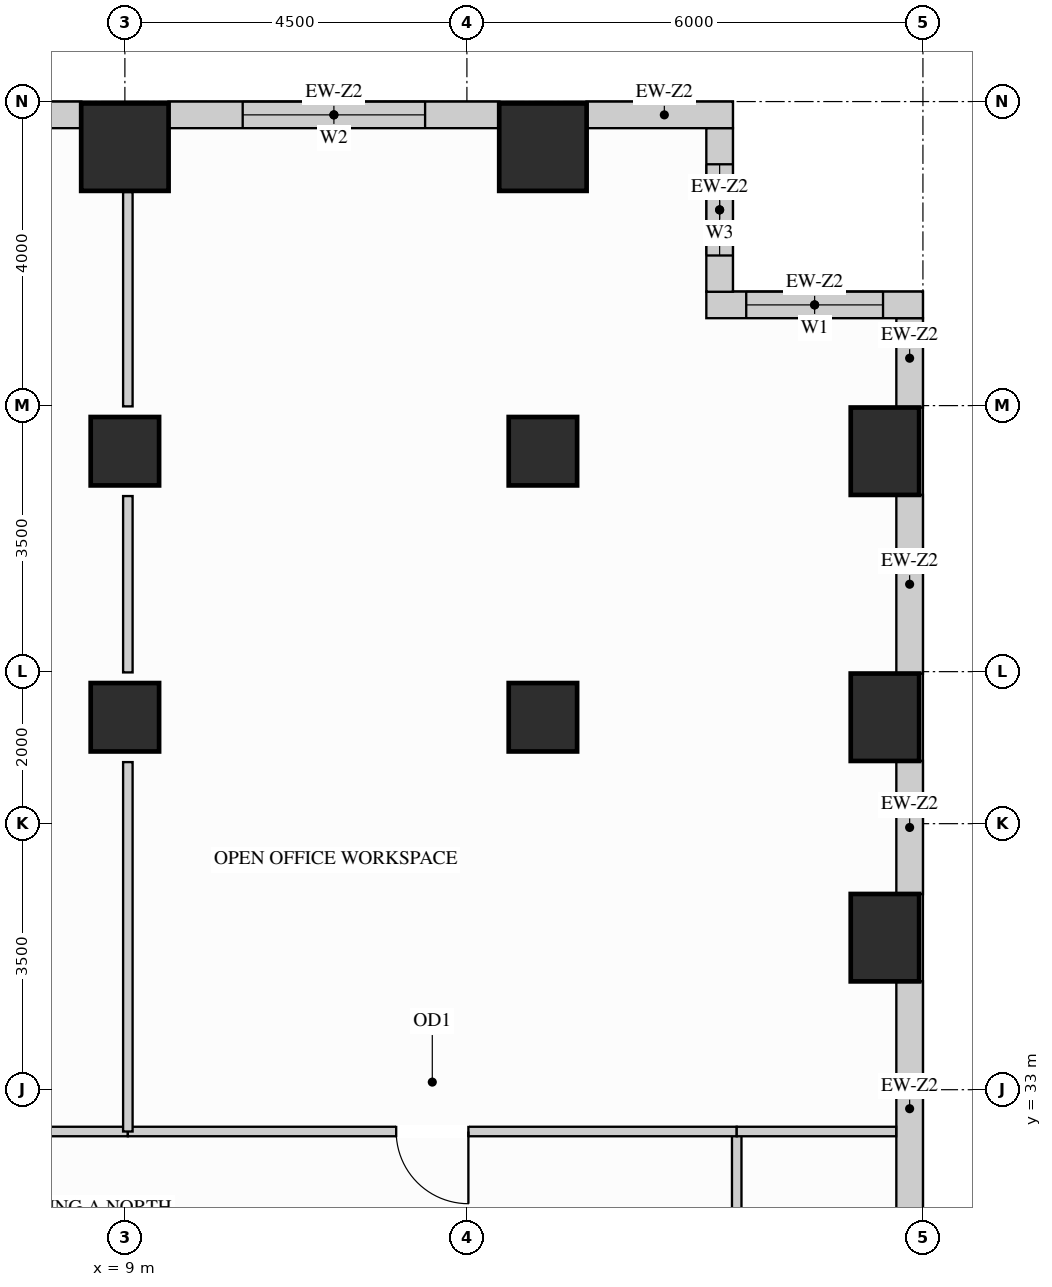
"""IFC4 building model, lengths in metres.
Left out: names, types, materials, properties, quantities, classifications, styles, units other than length and angle.
Written with IfcOpenShell. Run it as: python <this file> out.ifc"""

import sys

from ifc_helpers import new_model, si_unit, direction, frame, frame_2d, origin, origin_2d, place, context, subcontext, project, spatial, rectangle, extrude, source, transform, mapped, element, fill, save


model = new_model("IFC4")
c1 = context("Model", 3, precision=1e-05, world=origin(), true_north=direction((0.0, 1.0)))
c2 = subcontext(c1, "Body", "Model", "MODEL_VIEW")
j1 = project(units=[si_unit("LENGTHUNIT", "METRE"), si_unit("PLANEANGLEUNIT", "RADIAN")], contexts=[c1])
p1 = place(None, origin())
s1 = spatial("IfcSite", under=j1, at=p1, CompositionType="ELEMENT")
p2 = place(p1, origin())
s2 = spatial("IfcBuilding", under=s1, at=p2, CompositionType="ELEMENT")
p3 = place(p2, frame((0.0, 0.0, 131.4)))
s3 = spatial("IfcBuildingStorey", under=s2, at=p3, CompositionType="ELEMENT", Elevation=131.4)
m1 = source(origin(), c2, "Body", "SweptSolid", [
    extrude(rectangle(XDim=0.9, YDim=0.9, at=origin_2d()), origin(), (0.0, 0.0, 1.0), 3.38),
])
for number, where, z_axis, x_axis in (
    (1, (14.5, 37.9, 0.0), (0.0, 0.0, 1.0), (1.0, 0.0, 0.0)),
    (2, (14.5, 41.4, 0.0), (0.0, 0.0, 1.0), (1.0, 0.0, 0.0)),
    (3, (9.0, 37.9, 0.0), (0.0, 0.0, 1.0), (1.0, 0.0, 0.0)),
    (4, (9.0, 41.4, 0.0), (0.0, 0.0, 1.0), (1.0, 0.0, 0.0)),
):
    element("IfcColumn", number, at=place(p3, frame(where, z_axis=z_axis, x_axis=x_axis)), inside=s3, PredefinedType="COLUMN", context=c2, shape_type="MappedRepresentation", body=[
        mapped(m1, transform((0.0, 0.0, 0.0), x_axis=(1.0, 0.0, 0.0), y_axis=(0.0, 1.0, 0.0), z_axis=(0.0, 0.0, 1.0))),
    ])
m2 = source(origin(), c2, "Body", "SweptSolid", [
    extrude(rectangle(XDim=0.9, YDim=1.15, at=origin_2d()), origin(), (0.0, 0.0, 1.0), 3.38),
])
for number, where, z_axis, x_axis in (
    (5, (19.0, 35.0, 0.0), (0.0, 0.0, 1.0), (1.0, 0.0, 0.0)),
    (6, (19.0, 37.9, 0.0), (0.0, 0.0, 1.0), (1.0, 0.0, 0.0)),
    (7, (19.0, 41.4, 0.0), (0.0, 0.0, 1.0), (1.0, 0.0, 0.0)),
):
    element("IfcColumn", number, at=place(p3, frame(where, z_axis=z_axis, x_axis=x_axis)), inside=s3, PredefinedType="COLUMN", context=c2, shape_type="MappedRepresentation", body=[
        mapped(m2, transform((0.0, 0.0, 0.0), x_axis=(1.0, 0.0, 0.0), y_axis=(0.0, 1.0, 0.0), z_axis=(0.0, 0.0, 1.0))),
    ])
m3 = source(origin(), c2, "Body", "SweptSolid", [
    extrude(rectangle(XDim=1.15, YDim=1.15, at=origin_2d()), origin(), (0.0, 0.0, 1.0), 3.38),
])
for number, where, z_axis, x_axis in (
    (8, (14.5, 45.4, 0.0), (0.0, 0.0, 1.0), (1.0, 0.0, 0.0)),
    (9, (9.0, 45.4, 0.0), (0.0, 0.0, 1.0), (1.0, 0.0, 0.0)),
):
    element("IfcColumn", number, at=place(p3, frame(where, z_axis=z_axis, x_axis=x_axis)), inside=s3, PredefinedType="COLUMN", context=c2, shape_type="MappedRepresentation", body=[
        mapped(m3, transform((0.0, 0.0, 0.0), x_axis=(1.0, 0.0, 0.0), y_axis=(0.0, 1.0, 0.0), z_axis=(0.0, 0.0, 1.0))),
    ])
m4 = source(origin(), c2, "Body", "SweptSolid", [
    extrude(rectangle(XDim=3.354, YDim=0.35, at=frame_2d((1.677, 0.0))), origin(), (0.0, 0.0, 1.0), 2.519),
])
p4 = place(p3, frame((19.325, 31.073, 0.0), z_axis=(0.0, 0.0, 1.0), x_axis=(0.0, 1.0, 0.0)))
e10 = element("IfcWall", 10, at=p4, inside=s3, PredefinedType="SOLIDWALL", context=c2, shape_type="MappedRepresentation", body=[
    mapped(m4, transform((0.0, 0.0, 0.0), x_axis=(1.0, 0.0, 0.0), y_axis=(0.0, 1.0, 0.0), z_axis=(0.0, 0.0, 1.0))),
])
m5 = source(origin(), c2, "Body", "SweptSolid", [
    extrude(rectangle(XDim=1.754, YDim=0.35, at=frame_2d((0.877, 0.0))), origin(), (0.0, 0.0, 1.0), 2.519),
])
p5 = place(p3, frame((19.325, 35.573, 0.0), z_axis=(0.0, 0.0, 1.0), x_axis=(0.0, 1.0, 0.0)))
e11 = element("IfcWall", 11, at=p5, inside=s3, PredefinedType="SOLIDWALL", context=c2, shape_type="MappedRepresentation", body=[
    mapped(m5, transform((0.0, 0.0, 0.0), x_axis=(1.0, 0.0, 0.0), y_axis=(0.0, 1.0, 0.0), z_axis=(0.0, 0.0, 1.0))),
])
m6 = source(origin(), c2, "Body", "SweptSolid", [
    extrude(rectangle(XDim=2.354, YDim=0.35, at=frame_2d((1.177, 0.0))), origin(), (0.0, 0.0, 1.0), 2.519),
])
p6 = place(p3, frame((19.325, 38.473, 0.0), z_axis=(0.0, 0.0, 1.0), x_axis=(0.0, 1.0, 0.0)))
e12 = element("IfcWall", 12, at=p6, inside=s3, PredefinedType="SOLIDWALL", context=c2, shape_type="MappedRepresentation", body=[
    mapped(m6, transform((0.0, 0.0, 0.0), x_axis=(1.0, 0.0, 0.0), y_axis=(0.0, 1.0, 0.0), z_axis=(0.0, 0.0, 1.0))),
])
m7 = source(origin(), c2, "Body", "SweptSolid", [
    extrude(rectangle(XDim=1.179, YDim=0.35, at=frame_2d((0.59, 0.0))), origin(), (0.0, 0.0, 1.0), 3.365),
])
p7 = place(p3, frame((19.325, 41.973, 0.0), z_axis=(0.0, 0.0, 1.0), x_axis=(0.0, 1.0, 0.0)))
e13 = element("IfcWall", 13, at=p7, inside=s3, PredefinedType="SOLIDWALL", context=c2, shape_type="MappedRepresentation", body=[
    mapped(m7, transform((0.0, 0.0, 0.0), x_axis=(1.0, 0.0, 0.0), y_axis=(0.0, 1.0, 0.0), z_axis=(0.0, 0.0, 1.0))),
])
p8 = place(p3, frame((19.5, 43.325, 0.0), z_axis=(0.0, 0.0, 1.0), x_axis=(-1.0, 0.0, 0.0)))
e14 = element("IfcWall", 14, at=p8, inside=s3, PredefinedType="SOLIDWALL", context=c2, shape_type="SweptSolid", body=[
    extrude(rectangle(XDim=2.85, YDim=0.35, at=frame_2d((1.425, 0.0))), origin(), (0.0, 0.0, 1.0), 3.365),
])
p9 = place(p8, frame((0.525, 0.0, 0.78)))
e15 = element("IfcOpeningElement", 15, at=p9, cuts=e14, PredefinedType="OPENING", context=c2, shape_type="SweptSolid", body=[
    extrude(rectangle(XDim=1.8, YDim=2.1, at=frame_2d((0.9, 1.05))), frame((0.0, 0.185, 0.0), z_axis=(0.0, -1.0, 0.0), x_axis=(1.0, 0.0, 0.0)), (0.0, 0.0, 1.0), 0.37),
])
p10 = place(p3, frame((16.825, 43.498, 0.0), z_axis=(0.0, 0.0, 1.0), x_axis=(0.0, 1.0, 0.0)))
e16 = element("IfcWall", 16, at=p10, inside=s3, PredefinedType="SOLIDWALL", context=c2, shape_type="SweptSolid", body=[
    extrude(rectangle(XDim=2.154, YDim=0.35, at=frame_2d((1.077, 0.0))), origin(), (0.0, 0.0, 1.0), 3.365),
])
p11 = place(p10, frame((0.477, 0.0, 0.78)))
e17 = element("IfcOpeningElement", 17, at=p11, cuts=e16, PredefinedType="OPENING", context=c2, shape_type="SweptSolid", body=[
    extrude(rectangle(XDim=1.2, YDim=2.1, at=frame_2d((0.6, 1.05))), frame((0.0, 0.185, 0.0), z_axis=(0.0, -1.0, 0.0), x_axis=(1.0, 0.0, 0.0)), (0.0, 0.0, 1.0), 0.37),
])
m8 = source(origin(), c2, "Body", "SweptSolid", [
    extrude(rectangle(XDim=1.927, YDim=0.35, at=frame_2d((0.963, 0.0))), origin(), (0.0, 0.0, 1.0), 3.365),
])
p12 = place(p3, frame((17.0, 45.825, 0.0), z_axis=(0.0, 0.0, 1.0), x_axis=(-1.0, 0.0, 0.0)))
e18 = element("IfcWall", 18, at=p12, inside=s3, PredefinedType="SOLIDWALL", context=c2, shape_type="MappedRepresentation", body=[
    mapped(m8, transform((0.0, 0.0, 0.0), x_axis=(1.0, 0.0, 0.0), y_axis=(0.0, 1.0, 0.0), z_axis=(0.0, 0.0, 1.0))),
])
p13 = place(p3, frame((13.927, 45.825, 0.0), z_axis=(0.0, 0.0, 1.0), x_axis=(-1.0, 0.0, 0.0)))
e19 = element("IfcWall", 19, at=p13, inside=s3, PredefinedType="SOLIDWALL", context=c2, shape_type="SweptSolid", body=[
    extrude(rectangle(XDim=4.354, YDim=0.35, at=frame_2d((2.177, 0.0))), origin(), (0.0, 0.0, 1.0), 3.365),
])
p14 = place(p13, frame((0.977, 0.0, 0.78)))
e20 = element("IfcOpeningElement", 20, at=p14, cuts=e19, PredefinedType="OPENING", context=c2, shape_type="SweptSolid", body=[
    extrude(rectangle(XDim=2.4, YDim=2.1, at=frame_2d((1.2, 1.05))), frame((0.0, 0.185, 0.0), z_axis=(0.0, -1.0, 0.0), x_axis=(1.0, 0.0, 0.0)), (0.0, 0.0, 1.0), 0.37),
])
p15 = place(p3, frame((8.427, 45.825, 0.0), z_axis=(0.0, 0.0, 1.0), x_axis=(-1.0, 0.0, 0.0)))
e21 = element("IfcWall", 21, at=p15, inside=s3, PredefinedType="SOLIDWALL", context=c2, shape_type="SweptSolid", body=[
    extrude(rectangle(XDim=4.354, YDim=0.35, at=frame_2d((2.177, 0.0))), origin(), (0.0, 0.0, 1.0), 3.365),
])
p16 = place(p15, frame((0.977, 0.0, 0.78)))
e22 = element("IfcOpeningElement", 22, at=p16, cuts=e21, PredefinedType="OPENING", context=c2, shape_type="SweptSolid", body=[
    extrude(rectangle(XDim=2.4, YDim=2.1, at=frame_2d((1.2, 1.05))), frame((0.0, 0.185, 0.0), z_axis=(0.0, -1.0, 0.0), x_axis=(1.0, 0.0, 0.0)), (0.0, 0.0, 1.0), 0.37),
])
p17 = place(p3, frame((17.05, 26.05, 0.0), z_axis=(0.0, 0.0, 1.0), x_axis=(0.0, 1.0, 0.0)))
e23 = element("IfcWall", 23, at=p17, inside=s3, PredefinedType="PARTITIONING", context=c2, shape_type="SweptSolid", body=[
    extrude(rectangle(XDim=6.4, YDim=0.125, at=frame_2d((3.2, 0.0))), origin(), (0.0, 0.0, 1.0), 3.365),
])
p18 = place(p17, frame((2.725, 0.0, 0.0)))
e24 = element("IfcOpeningElement", 24, at=p18, cuts=e23, PredefinedType="OPENING", context=c2, shape_type="SweptSolid", body=[
    extrude(rectangle(XDim=0.95, YDim=2.15, at=frame_2d((0.475, 1.075))), frame((0.0, 0.073, 0.0), z_axis=(0.0, -1.0, 0.0), x_axis=(1.0, 0.0, 0.0)), (0.0, 0.0, 1.0), 0.145),
])
p19 = place(p3, frame((2.45, 32.45, 0.0), z_axis=(0.0, 0.0, 1.0), x_axis=(1.0, 0.0, 0.0)))
e25 = element("IfcWall", 25, at=p19, inside=s3, PredefinedType="PARTITIONING", context=c2, shape_type="SweptSolid", body=[
    extrude(rectangle(XDim=6.589, YDim=0.125, at=frame_2d((3.294, 0.0))), origin(), (0.0, 0.0, 1.0), 3.365),
])
p20 = place(p19, frame((2.82, 0.0, 0.0)))
e26 = element("IfcOpeningElement", 26, at=p20, cuts=e25, PredefinedType="OPENING", context=c2, shape_type="SweptSolid", body=[
    extrude(rectangle(XDim=0.95, YDim=2.15, at=frame_2d((0.475, 1.075))), frame((0.0, 0.073, 0.0), z_axis=(0.0, -1.0, 0.0), x_axis=(1.0, 0.0, 0.0)), (0.0, 0.0, 1.0), 0.145),
])
p21 = place(p3, frame((9.039, 32.45, 0.0), z_axis=(0.0, 0.0, 1.0), x_axis=(1.0, 0.0, 0.0)))
e27 = element("IfcWall", 27, at=p21, inside=s3, PredefinedType="PARTITIONING", context=c2, shape_type="SweptSolid", body=[
    extrude(rectangle(XDim=8.011, YDim=0.125, at=frame_2d((4.005, 0.0))), origin(), (0.0, 0.0, 1.0), 3.365),
])
p22 = place(p21, frame((3.531, 0.0, 0.0)))
e28 = element("IfcOpeningElement", 28, at=p22, cuts=e27, PredefinedType="OPENING", context=c2, shape_type="SweptSolid", body=[
    extrude(rectangle(XDim=0.95, YDim=2.15, at=frame_2d((0.475, 1.075))), frame((0.0, 0.073, 0.0), z_axis=(0.0, -1.0, 0.0), x_axis=(1.0, 0.0, 0.0)), (0.0, 0.0, 1.0), 0.145),
])
m9 = source(origin(), c2, "Body", "SweptSolid", [
    extrude(rectangle(XDim=2.098, YDim=0.125, at=frame_2d((1.049, 0.0))), origin(), (0.0, 0.0, 1.0), 3.365),
])
p23 = place(p3, frame((17.05, 32.45, 0.0), z_axis=(0.0, 0.0, 1.0), x_axis=(1.0, 0.0, 0.0)))
e29 = element("IfcWall", 29, at=p23, inside=s3, PredefinedType="PARTITIONING", context=c2, shape_type="MappedRepresentation", body=[
    mapped(m9, transform((0.0, 0.0, 0.0), x_axis=(1.0, 0.0, 0.0), y_axis=(0.0, 1.0, 0.0), z_axis=(0.0, 0.0, 1.0))),
])
m10 = source(origin(), c2, "Body", "SweptSolid", [
    extrude(rectangle(XDim=4.86, YDim=0.125, at=frame_2d((2.43, 0.0))), origin(), (0.0, 0.0, 1.0), 3.365),
])
p24 = place(p3, frame((9.039, 32.45, 0.0), z_axis=(0.0, 0.0, 1.0), x_axis=(0.0, 1.0, 0.0)))
e30 = element("IfcWall", 30, at=p24, inside=s3, PredefinedType="PARTITIONING", context=c2, shape_type="MappedRepresentation", body=[
    mapped(m10, transform((0.0, 0.0, 0.0), x_axis=(1.0, 0.0, 0.0), y_axis=(0.0, 1.0, 0.0), z_axis=(0.0, 0.0, 1.0))),
])
m11 = source(origin(), c2, "Body", "SweptSolid", [
    extrude(rectangle(XDim=2.32, YDim=0.125, at=frame_2d((1.16, 0.0))), origin(), (0.0, 0.0, 1.0), 2.677),
])
p25 = place(p3, frame((9.039, 38.49, 0.0), z_axis=(0.0, 0.0, 1.0), x_axis=(0.0, 1.0, 0.0)))
e31 = element("IfcWall", 31, at=p25, inside=s3, PredefinedType="PARTITIONING", context=c2, shape_type="MappedRepresentation", body=[
    mapped(m11, transform((0.0, 0.0, 0.0), x_axis=(1.0, 0.0, 0.0), y_axis=(0.0, 1.0, 0.0), z_axis=(0.0, 0.0, 1.0))),
])
m12 = source(origin(), c2, "Body", "SweptSolid", [
    extrude(rectangle(XDim=2.82, YDim=0.125, at=frame_2d((1.41, 0.0))), origin(), (0.0, 0.0, 1.0), 2.677),
])
p26 = place(p3, frame((9.039, 41.99, 0.0), z_axis=(0.0, 0.0, 1.0), x_axis=(0.0, 1.0, 0.0)))
e32 = element("IfcWall", 32, at=p26, inside=s3, PredefinedType="PARTITIONING", context=c2, shape_type="MappedRepresentation", body=[
    mapped(m12, transform((0.0, 0.0, 0.0), x_axis=(1.0, 0.0, 0.0), y_axis=(0.0, 1.0, 0.0), z_axis=(0.0, 0.0, 1.0))),
])
m13 = source(origin(), c2, "Body", "SweptSolid", [
    extrude(rectangle(XDim=0.95, YDim=2.15, at=frame_2d((0.475, 1.075))), frame((0.0, 0.025, 0.0), z_axis=(0.0, -1.0, 0.0), x_axis=(1.0, 0.0, 0.0)), (0.0, 0.0, 1.0), 0.05),
])
p27 = place(p22, origin())
e33 = element("IfcDoor", 33, at=p27, inside=s3, OperationType="SINGLE_SWING_RIGHT", PredefinedType="DOOR", context=c2, shape_type="MappedRepresentation", body=[
    mapped(m13, transform((0.0, 0.0, 0.0), x_axis=(1.0, 0.0, 0.0), y_axis=(0.0, 1.0, 0.0), z_axis=(0.0, 0.0, 1.0))),
])
fill(e28, e33)
m14 = source(origin(), c2, "Body", "SweptSolid", [
    extrude(rectangle(XDim=1.8, YDim=2.1, at=frame_2d((0.9, 1.05))), frame((0.0, 0.03, 0.0), z_axis=(0.0, -1.0, 0.0), x_axis=(1.0, 0.0, 0.0)), (0.0, 0.0, 1.0), 0.06),
])
p28 = place(p9, origin())
e34 = element("IfcWindow", 34, at=p28, inside=s3, PartitioningType="SINGLE_PANEL", PredefinedType="WINDOW", context=c2, shape_type="MappedRepresentation", body=[
    mapped(m14, transform((0.0, 0.0, 0.0), x_axis=(1.0, 0.0, 0.0), y_axis=(0.0, 1.0, 0.0), z_axis=(0.0, 0.0, 1.0))),
])
fill(e15, e34)
m15 = source(origin(), c2, "Body", "SweptSolid", [
    extrude(rectangle(XDim=2.4, YDim=2.1, at=frame_2d((1.2, 1.05))), frame((0.0, 0.03, 0.0), z_axis=(0.0, -1.0, 0.0), x_axis=(1.0, 0.0, 0.0)), (0.0, 0.0, 1.0), 0.06),
])
p29 = place(p14, origin())
e35 = element("IfcWindow", 35, at=p29, inside=s3, PartitioningType="SINGLE_PANEL", PredefinedType="WINDOW", context=c2, shape_type="MappedRepresentation", body=[
    mapped(m15, transform((0.0, 0.0, 0.0), x_axis=(1.0, 0.0, 0.0), y_axis=(0.0, 1.0, 0.0), z_axis=(0.0, 0.0, 1.0))),
])
fill(e20, e35)
m16 = source(origin(), c2, "Body", "SweptSolid", [
    extrude(rectangle(XDim=1.2, YDim=2.1, at=frame_2d((0.6, 1.05))), frame((0.0, 0.03, 0.0), z_axis=(0.0, -1.0, 0.0), x_axis=(1.0, 0.0, 0.0)), (0.0, 0.0, 1.0), 0.06),
])
p30 = place(p11, origin())
e36 = element("IfcWindow", 36, at=p30, inside=s3, PartitioningType="SINGLE_PANEL", PredefinedType="WINDOW", context=c2, shape_type="MappedRepresentation", body=[
    mapped(m16, transform((0.0, 0.0, 0.0), x_axis=(1.0, 0.0, 0.0), y_axis=(0.0, 1.0, 0.0), z_axis=(0.0, 0.0, 1.0))),
])
fill(e17, e36)
save(model, sys.argv[1])
